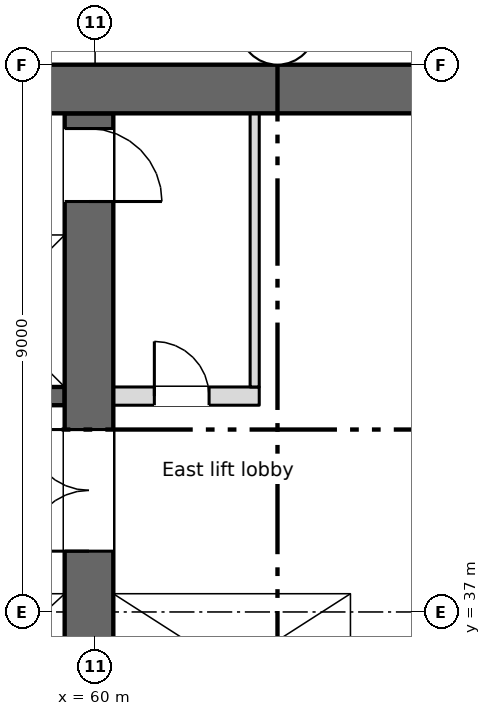
"""IFC4 building model, lengths in metres.
Left out: names, types, materials, properties, quantities, classifications, styles, units other than length and angle.
Written with IfcOpenShell. Run it as: python <this file> out.ifc"""

import sys

from ifc_helpers import new_model, si_unit, direction, frame, frame_2d, origin, place, context, subcontext, project, spatial, rectangle, extrude, element, fill, save


model = new_model("IFC4")
c1 = context("Model", 3, precision=1e-05, world=origin(), true_north=direction((0.0, 1.0)))
c2 = subcontext(c1, "Body", "Model", "MODEL_VIEW")
j1 = project(units=[si_unit("LENGTHUNIT", "METRE"), si_unit("PLANEANGLEUNIT", "RADIAN")], contexts=[c1])
p1 = place(None, origin())
s1 = spatial("IfcSite", under=j1, at=p1, CompositionType="ELEMENT")
p2 = place(p1, origin())
s2 = spatial("IfcBuilding", under=s1, at=p2, CompositionType="ELEMENT")
p3 = place(p2, frame((0.0, 0.0, 106.25)))
s3 = spatial("IfcBuildingStorey", under=s2, at=p3, CompositionType="ELEMENT", Elevation=106.25)
p4 = place(p3, frame((5.55, 45.6, 0.0), z_axis=(0.0, 0.0, 1.0), x_axis=(1.0, 0.0, 0.0)))
e1 = element("IfcWall", 1, at=p4, inside=s3, PredefinedType="SHEAR", context=c2, shape_type="SweptSolid", body=[
    extrude(rectangle(XDim=60.9, YDim=0.8, at=frame_2d((30.45, 0.0))), origin(), (0.0, 0.0, 1.0), 3.35),
])
p5 = place(p4, frame((1.2, 0.0, 0.6)))
e2 = element("IfcOpeningElement", 2, at=p5, cuts=e1, PredefinedType="OPENING", context=c2, shape_type="SweptSolid", body=[
    extrude(rectangle(XDim=0.6, YDim=2.4, at=frame_2d((0.3, 1.2))), frame((0.0, 0.41, 0.0), z_axis=(0.0, -1.0, 0.0), x_axis=(1.0, 0.0, 0.0)), (0.0, 0.0, 1.0), 0.82),
])
p6 = place(p4, frame((7.2, 0.0, 0.6)))
e3 = element("IfcOpeningElement", 3, at=p6, cuts=e1, PredefinedType="OPENING", context=c2, shape_type="SweptSolid", body=[
    extrude(rectangle(XDim=0.6, YDim=2.4, at=frame_2d((0.3, 1.2))), frame((0.0, 0.41, 0.0), z_axis=(0.0, -1.0, 0.0), x_axis=(1.0, 0.0, 0.0)), (0.0, 0.0, 1.0), 0.82),
])
p7 = place(p3, frame((64.35, 34.8, 0.0), z_axis=(0.0, 0.0, 1.0), x_axis=(0.0, 1.0, 0.0)))
e4 = element("IfcWall", 4, at=p7, inside=s3, PredefinedType="SHEAR", context=c2, shape_type="SweptSolid", body=[
    extrude(rectangle(XDim=10.4, YDim=0.3, at=frame_2d((5.2, 0.0))), origin(), (0.0, 0.0, 1.0), 3.35),
])
p8 = place(p3, frame((59.9, 28.4, 0.0), z_axis=(0.0, 0.0, 1.0), x_axis=(0.0, 1.0, 0.0)))
e5 = element("IfcWall", 5, at=p8, inside=s3, PredefinedType="SHEAR", context=c2, shape_type="SweptSolid", body=[
    extrude(rectangle(XDim=16.8, YDim=0.8, at=frame_2d((8.4, 0.0))), origin(), (0.0, 0.0, 1.0), 3.35),
])
p9 = place(p8, frame((9.6, 0.0, 0.0)))
e6 = element("IfcOpeningElement", 6, at=p9, cuts=e5, PredefinedType="OPENING", context=c2, shape_type="SweptSolid", body=[
    extrude(rectangle(XDim=2.0, YDim=2.1, at=frame_2d((1.0, 1.05))), frame((0.0, 0.41, 0.0), z_axis=(0.0, -1.0, 0.0), x_axis=(1.0, 0.0, 0.0)), (0.0, 0.0, 1.0), 0.82),
])
p10 = place(p8, frame((15.35, 0.0, 0.0)))
e7 = element("IfcOpeningElement", 7, at=p10, cuts=e5, PredefinedType="OPENING", context=c2, shape_type="SweptSolid", body=[
    extrude(rectangle(XDim=1.2, YDim=2.1, at=frame_2d((0.6, 1.05))), frame((0.0, 0.41, 0.0), z_axis=(0.0, -1.0, 0.0), x_axis=(1.0, 0.0, 0.0)), (0.0, 0.0, 1.0), 0.82),
])
p11 = place(p3, frame((47.3, 37.45, 0.0), z_axis=(0.0, 0.0, 1.0), x_axis=(1.0, 0.0, 0.0)))
e8 = element("IfcWall", 8, at=p11, inside=s3, PredefinedType="SHEAR", context=c2, shape_type="SweptSolid", body=[
    extrude(rectangle(XDim=12.2, YDim=0.3, at=frame_2d((6.1, 0.0))), origin(), (0.0, 0.0, 1.0), 3.35),
])
p12 = place(p11, frame((4.3, 0.0, 0.0)))
e9 = element("IfcOpeningElement", 9, at=p12, cuts=e8, PredefinedType="OPENING", context=c2, shape_type="SweptSolid", body=[
    extrude(rectangle(XDim=1.1, YDim=2.1, at=frame_2d((0.55, 1.05))), frame((0.0, 0.16, 0.0), z_axis=(0.0, -1.0, 0.0), x_axis=(1.0, 0.0, 0.0)), (0.0, 0.0, 1.0), 0.32),
])
p13 = place(p11, frame((7.3, 0.0, 0.0)))
e10 = element("IfcOpeningElement", 10, at=p13, cuts=e8, PredefinedType="OPENING", context=c2, shape_type="SweptSolid", body=[
    extrude(rectangle(XDim=1.1, YDim=2.1, at=frame_2d((0.55, 1.05))), frame((0.0, 0.16, 0.0), z_axis=(0.0, -1.0, 0.0), x_axis=(1.0, 0.0, 0.0)), (0.0, 0.0, 1.0), 0.32),
])
p14 = place(p11, frame((10.3, 0.0, 0.0)))
e11 = element("IfcOpeningElement", 11, at=p14, cuts=e8, PredefinedType="OPENING", context=c2, shape_type="SweptSolid", body=[
    extrude(rectangle(XDim=1.1, YDim=2.1, at=frame_2d((0.55, 1.05))), frame((0.0, 0.16, 0.0), z_axis=(0.0, -1.0, 0.0), x_axis=(1.0, 0.0, 0.0)), (0.0, 0.0, 1.0), 0.32),
])
p15 = place(p3, frame((60.3, 37.45, 0.0), z_axis=(0.0, 0.0, 1.0), x_axis=(1.0, 0.0, 0.0)))
e12 = element("IfcWall", 12, at=p15, inside=s3, PredefinedType="SHEAR", context=c2, shape_type="SweptSolid", body=[
    extrude(rectangle(XDim=3.9, YDim=0.3, at=frame_2d((1.95, 0.0))), origin(), (0.0, 0.0, 1.0), 3.35),
])
p16 = place(p15, frame((1.4, 0.0, 0.0)))
e13 = element("IfcOpeningElement", 13, at=p16, cuts=e12, PredefinedType="OPENING", context=c2, shape_type="SweptSolid", body=[
    extrude(rectangle(XDim=1.1, YDim=2.1, at=frame_2d((0.55, 1.05))), frame((0.0, 0.16, 0.0), z_axis=(0.0, -1.0, 0.0), x_axis=(1.0, 0.0, 0.0)), (0.0, 0.0, 1.0), 0.32),
])
p17 = place(p3, frame((18.5, 40.55, 0.0), z_axis=(0.0, 0.0, 1.0), x_axis=(1.0, 0.0, 0.0)))
e14 = element("IfcWall", 14, at=p17, inside=s3, PredefinedType="SHEAR", context=c2, shape_type="SweptSolid", body=[
    extrude(rectangle(XDim=41.0, YDim=0.3, at=frame_2d((20.5, 0.0))), origin(), (0.0, 0.0, 1.0), 3.35),
])
p18 = place(p17, frame((18.65, 0.0, 0.0)))
e15 = element("IfcOpeningElement", 15, at=p18, cuts=e14, PredefinedType="OPENING", context=c2, shape_type="SweptSolid", body=[
    extrude(rectangle(XDim=0.9, YDim=2.1, at=frame_2d((0.45, 1.05))), frame((0.0, 0.16, 0.0), z_axis=(0.0, -1.0, 0.0), x_axis=(1.0, 0.0, 0.0)), (0.0, 0.0, 1.0), 0.32),
])
p19 = place(p17, frame((6.175, 0.0, 0.0)))
e16 = element("IfcOpeningElement", 16, at=p19, cuts=e14, PredefinedType="OPENING", context=c2, shape_type="SweptSolid", body=[
    extrude(rectangle(XDim=1.1, YDim=2.1, at=frame_2d((0.55, 1.05))), frame((0.0, 0.16, 0.0), z_axis=(0.0, -1.0, 0.0), x_axis=(1.0, 0.0, 0.0)), (0.0, 0.0, 1.0), 0.32),
])
p20 = place(p17, frame((8.925, 0.0, 0.0)))
e17 = element("IfcOpeningElement", 17, at=p20, cuts=e14, PredefinedType="OPENING", context=c2, shape_type="SweptSolid", body=[
    extrude(rectangle(XDim=1.1, YDim=2.1, at=frame_2d((0.55, 1.05))), frame((0.0, 0.16, 0.0), z_axis=(0.0, -1.0, 0.0), x_axis=(1.0, 0.0, 0.0)), (0.0, 0.0, 1.0), 0.32),
])
p21 = place(p17, frame((11.675, 0.0, 0.0)))
e18 = element("IfcOpeningElement", 18, at=p21, cuts=e14, PredefinedType="OPENING", context=c2, shape_type="SweptSolid", body=[
    extrude(rectangle(XDim=1.1, YDim=2.1, at=frame_2d((0.55, 1.05))), frame((0.0, 0.16, 0.0), z_axis=(0.0, -1.0, 0.0), x_axis=(1.0, 0.0, 0.0)), (0.0, 0.0, 1.0), 0.32),
])
p22 = place(p17, frame((30.925, 0.0, 0.0)))
e19 = element("IfcOpeningElement", 19, at=p22, cuts=e14, PredefinedType="OPENING", context=c2, shape_type="SweptSolid", body=[
    extrude(rectangle(XDim=1.1, YDim=2.1, at=frame_2d((0.55, 1.05))), frame((0.0, 0.16, 0.0), z_axis=(0.0, -1.0, 0.0), x_axis=(1.0, 0.0, 0.0)), (0.0, 0.0, 1.0), 0.32),
])
p23 = place(p17, frame((33.675, 0.0, 0.0)))
e20 = element("IfcOpeningElement", 20, at=p23, cuts=e14, PredefinedType="OPENING", context=c2, shape_type="SweptSolid", body=[
    extrude(rectangle(XDim=1.1, YDim=2.1, at=frame_2d((0.55, 1.05))), frame((0.0, 0.16, 0.0), z_axis=(0.0, -1.0, 0.0), x_axis=(1.0, 0.0, 0.0)), (0.0, 0.0, 1.0), 0.32),
])
p24 = place(p17, frame((36.375, 0.0, 0.0)))
e21 = element("IfcOpeningElement", 21, at=p24, cuts=e14, PredefinedType="OPENING", context=c2, shape_type="SweptSolid", body=[
    extrude(rectangle(XDim=1.2, YDim=2.1, at=frame_2d((0.6, 1.05))), frame((0.0, 0.16, 0.0), z_axis=(0.0, -1.0, 0.0), x_axis=(1.0, 0.0, 0.0)), (0.0, 0.0, 1.0), 0.32),
])
p25 = place(p17, frame((39.15, 0.0, 0.0)))
e22 = element("IfcOpeningElement", 22, at=p25, cuts=e14, PredefinedType="OPENING", context=c2, shape_type="SweptSolid", body=[
    extrude(rectangle(XDim=1.2, YDim=2.1, at=frame_2d((0.6, 1.05))), frame((0.0, 0.16, 0.0), z_axis=(0.0, -1.0, 0.0), x_axis=(1.0, 0.0, 0.0)), (0.0, 0.0, 1.0), 0.32),
])
p26 = place(p3, frame((18.5, 43.35, 0.0), z_axis=(0.0, 0.0, 1.0), x_axis=(1.0, 0.0, 0.0)))
e23 = element("IfcWall", 23, at=p26, inside=s3, PredefinedType="SHEAR", context=c2, shape_type="SweptSolid", body=[
    extrude(rectangle(XDim=41.0, YDim=0.3, at=frame_2d((20.5, 0.0))), origin(), (0.0, 0.0, 1.0), 3.35),
])
p27 = place(p3, frame((60.3, 40.55, 0.0), z_axis=(0.0, 0.0, 1.0), x_axis=(1.0, 0.0, 0.0)))
e24 = element("IfcWall", 24, at=p27, inside=s3, PredefinedType="PARTITIONING", context=c2, shape_type="SweptSolid", body=[
    extrude(rectangle(XDim=2.4, YDim=0.3, at=frame_2d((1.2, 0.0))), origin(), (0.0, 0.0, 1.0), 3.35),
])
p28 = place(p27, frame((0.675, 0.0, 0.0)))
e25 = element("IfcOpeningElement", 25, at=p28, cuts=e24, PredefinedType="OPENING", context=c2, shape_type="SweptSolid", body=[
    extrude(rectangle(XDim=0.9, YDim=2.1, at=frame_2d((0.45, 1.05))), frame((0.0, 0.16, 0.0), z_axis=(0.0, -1.0, 0.0), x_axis=(1.0, 0.0, 0.0)), (0.0, 0.0, 1.0), 0.32),
])
p29 = place(p3, frame((62.625, 40.7, 0.0), z_axis=(0.0, 0.0, 1.0), x_axis=(0.0, 1.0, 0.0)))
e26 = element("IfcWall", 26, at=p29, inside=s3, PredefinedType="PARTITIONING", context=c2, shape_type="SweptSolid", body=[
    extrude(rectangle(XDim=4.5, YDim=0.15, at=frame_2d((2.25, 0.0))), origin(), (0.0, 0.0, 1.0), 3.35),
])
p30 = place(p28, origin())
e27 = element("IfcDoor", 27, at=p30, inside=s3, OperationType="SINGLE_SWING_LEFT", PredefinedType="DOOR", context=c2, shape_type="SweptSolid", body=[
    extrude(rectangle(XDim=0.9, YDim=2.1, at=frame_2d((0.45, 1.05))), frame((0.0, 0.025, 0.0), z_axis=(0.0, -1.0, 0.0), x_axis=(1.0, 0.0, 0.0)), (0.0, 0.0, 1.0), 0.05),
])
fill(e25, e27)
p31 = place(p16, origin())
e28 = element("IfcDoor", 28, at=p31, inside=s3, OperationType="SLIDING_TO_LEFT", PredefinedType="DOOR", context=c2, shape_type="SweptSolid", body=[
    extrude(rectangle(XDim=1.1, YDim=2.1, at=frame_2d((0.55, 1.05))), frame((0.0, 0.025, 0.0), z_axis=(0.0, -1.0, 0.0), x_axis=(1.0, 0.0, 0.0)), (0.0, 0.0, 1.0), 0.05),
])
fill(e13, e28)
p32 = place(p9, origin())
e29 = element("IfcDoor", 29, at=p32, inside=s3, OperationType="DOUBLE_DOOR_SINGLE_SWING", PredefinedType="DOOR", context=c2, shape_type="SweptSolid", body=[
    extrude(rectangle(XDim=2.0, YDim=2.1, at=frame_2d((1.0, 1.05))), frame((0.0, 0.025, 0.0), z_axis=(0.0, -1.0, 0.0), x_axis=(1.0, 0.0, 0.0)), (0.0, 0.0, 1.0), 0.05),
])
fill(e6, e29)
p33 = place(p10, origin())
e30 = element("IfcDoor", 30, at=p33, inside=s3, OperationType="SINGLE_SWING_LEFT", PredefinedType="DOOR", context=c2, shape_type="SweptSolid", body=[
    extrude(rectangle(XDim=1.2, YDim=2.1, at=frame_2d((0.6, 1.05))), frame((0.0, 0.025, 0.0), z_axis=(0.0, -1.0, 0.0), x_axis=(1.0, 0.0, 0.0)), (0.0, 0.0, 1.0), 0.05),
])
fill(e7, e30)
save(model, sys.argv[1])
